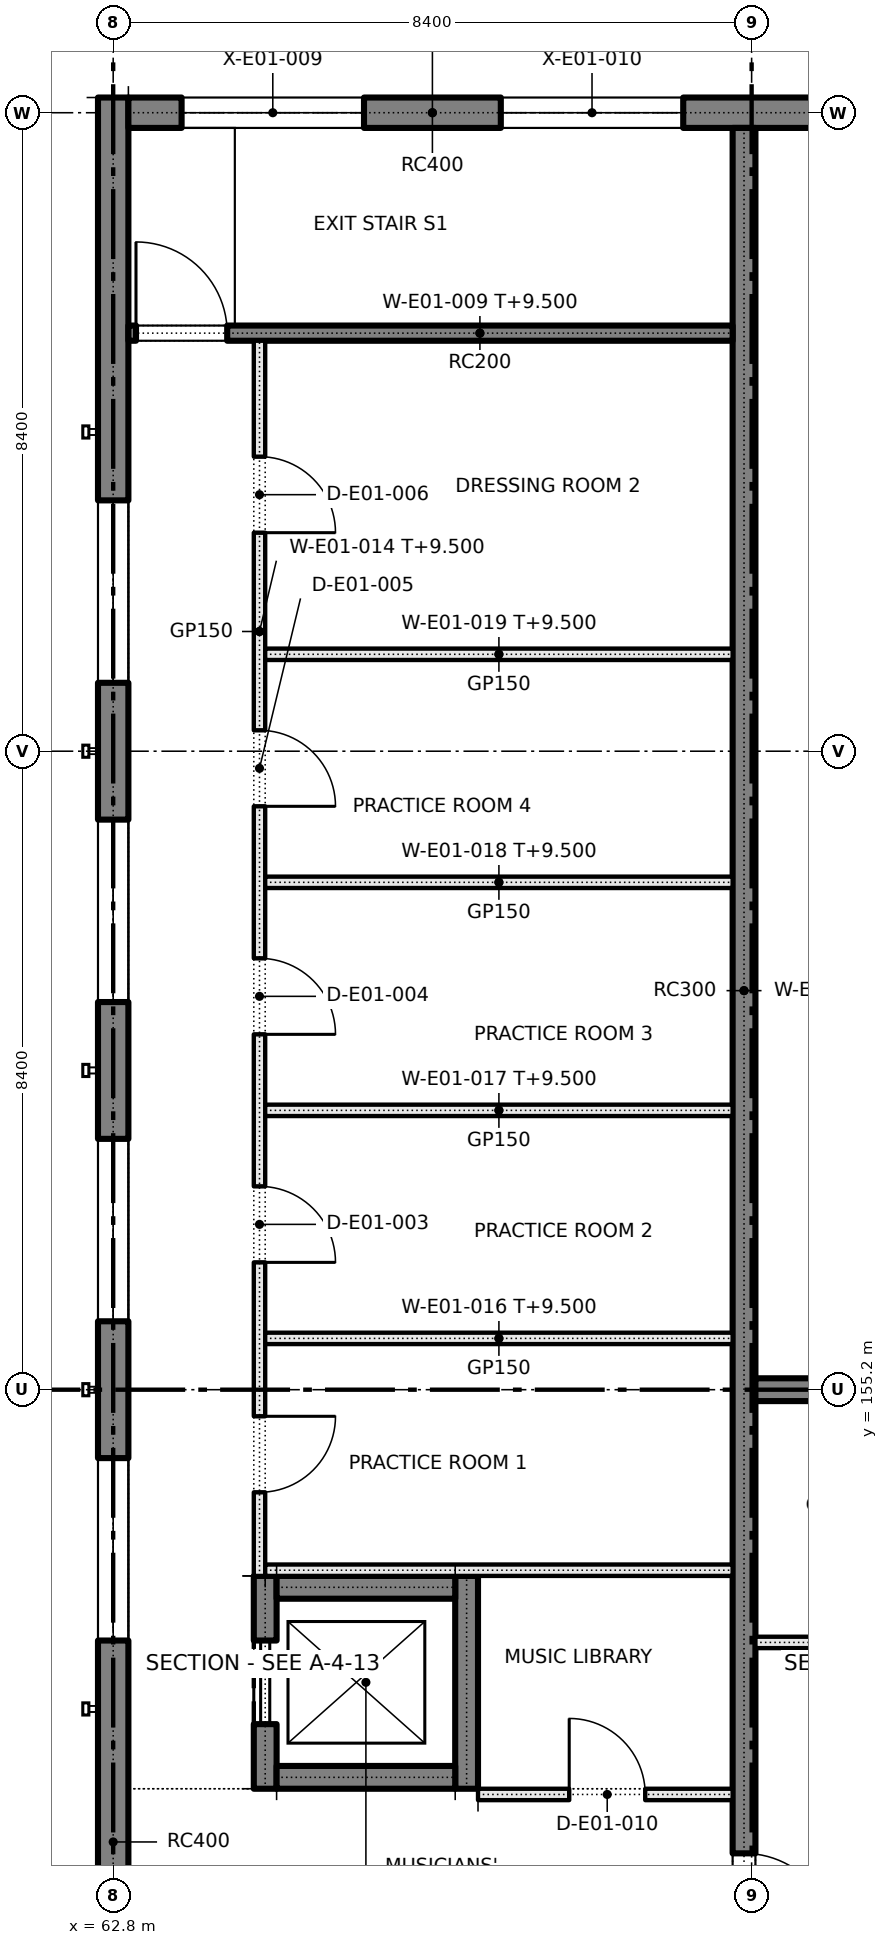
"""IFC4 building model, lengths in metres.
Left out: names, types, materials, properties, quantities, classifications, styles, units other than length and angle.
Written with IfcOpenShell. Run it as: python <this file> out.ifc"""

import sys

from ifc_helpers import new_model, si_unit, direction, frame, frame_2d, origin, place, context, subcontext, project, spatial, polyline, rectangle, outline, extrude, element, fill, save


model = new_model("IFC4")
c1 = context("Model", 3, precision=1e-05, world=origin(), true_north=direction((0.0, 1.0)))
c2 = subcontext(c1, "Body", "Model", "MODEL_VIEW")
j1 = project(units=[si_unit("LENGTHUNIT", "METRE"), si_unit("PLANEANGLEUNIT", "RADIAN")], contexts=[c1])
p1 = place(None, origin())
s1 = spatial("IfcSite", under=j1, at=p1, CompositionType="ELEMENT")
p2 = place(p1, origin())
s2 = spatial("IfcBuilding", under=s1, at=p2, CompositionType="ELEMENT")
p3 = place(p2, frame((0.0, 0.0, 5.4)))
s3 = spatial("IfcBuildingStorey", under=s2, at=p3, CompositionType="ELEMENT", Elevation=5.4)
p4 = place(p3, frame((62.8, 146.6, 0.0), z_axis=(0.0, 0.0, 1.0), x_axis=(0.0, 1.0, 0.0)))
e1 = element("IfcWall", 1, at=p4, inside=s3, PredefinedType="SOLIDWALL", context=c2, shape_type="SweptSolid", body=[
    extrude(rectangle(XDim=25.6, YDim=0.4, at=frame_2d((12.8, 0.0))), origin(), (0.0, 0.0, 1.0), 4.1),
])
p5 = place(p4, frame((5.3, 0.0, 0.9)))
e2 = element("IfcOpeningElement", 2, at=p5, cuts=e1, PredefinedType="OPENING", context=c2, shape_type="SweptSolid", body=[
    extrude(rectangle(XDim=2.4, YDim=2.4, at=frame_2d((1.2, 1.2))), frame((0.0, 0.21, 0.0), z_axis=(0.0, -1.0, 0.0), x_axis=(1.0, 0.0, 0.0)), (0.0, 0.0, 1.0), 0.42),
])
p6 = place(p4, frame((9.5, 0.0, 0.9)))
e3 = element("IfcOpeningElement", 3, at=p6, cuts=e1, PredefinedType="OPENING", context=c2, shape_type="SweptSolid", body=[
    extrude(rectangle(XDim=2.4, YDim=2.4, at=frame_2d((1.2, 1.2))), frame((0.0, 0.21, 0.0), z_axis=(0.0, -1.0, 0.0), x_axis=(1.0, 0.0, 0.0)), (0.0, 0.0, 1.0), 0.42),
])
p7 = place(p4, frame((13.7, 0.0, 0.9)))
e4 = element("IfcOpeningElement", 4, at=p7, cuts=e1, PredefinedType="OPENING", context=c2, shape_type="SweptSolid", body=[
    extrude(rectangle(XDim=2.4, YDim=2.4, at=frame_2d((1.2, 1.2))), frame((0.0, 0.21, 0.0), z_axis=(0.0, -1.0, 0.0), x_axis=(1.0, 0.0, 0.0)), (0.0, 0.0, 1.0), 0.42),
])
p8 = place(p4, frame((17.9, 0.0, 0.9)))
e5 = element("IfcOpeningElement", 5, at=p8, cuts=e1, PredefinedType="OPENING", context=c2, shape_type="SweptSolid", body=[
    extrude(rectangle(XDim=2.4, YDim=2.4, at=frame_2d((1.2, 1.2))), frame((0.0, 0.21, 0.0), z_axis=(0.0, -1.0, 0.0), x_axis=(1.0, 0.0, 0.0)), (0.0, 0.0, 1.0), 0.42),
])
p9 = place(p3, frame((63.0, 172.0, 0.0), z_axis=(0.0, 0.0, 1.0), x_axis=(1.0, 0.0, 0.0)))
e6 = element("IfcWall", 6, at=p9, inside=s3, PredefinedType="SOLIDWALL", context=c2, shape_type="SweptSolid", body=[
    extrude(outline(polyline([(0.0, 0.0), (24.8, 0.0), (24.8, 4.166), (22.802, 4.935), (20.721, 5.574), (18.641, 6.063), (16.561, 6.407), (14.48, 6.612), (12.4, 6.68), (10.32, 6.612), (8.239, 6.407), (6.159, 6.063), (4.079, 5.574), (1.998, 4.935), (0.0, 4.166), (0.0, 0.0)])), frame((0.0, 0.2, 0.0), z_axis=(0.0, -1.0, 0.0), x_axis=(1.0, 0.0, 0.0)), (0.0, 0.0, 1.0), 0.4),
])
p10 = place(p9, frame((0.7, 0.0, 1.5)))
e7 = element("IfcOpeningElement", 7, at=p10, cuts=e6, PredefinedType="OPENING", context=c2, shape_type="SweptSolid", body=[
    extrude(rectangle(XDim=2.4, YDim=2.1, at=frame_2d((1.2, 1.05))), frame((0.0, 0.21, 0.0), z_axis=(0.0, -1.0, 0.0), x_axis=(1.0, 0.0, 0.0)), (0.0, 0.0, 1.0), 0.42),
])
p11 = place(p9, frame((4.9, 0.0, 1.5)))
e8 = element("IfcOpeningElement", 8, at=p11, cuts=e6, PredefinedType="OPENING", context=c2, shape_type="SweptSolid", body=[
    extrude(rectangle(XDim=2.4, YDim=2.1, at=frame_2d((1.2, 1.05))), frame((0.0, 0.21, 0.0), z_axis=(0.0, -1.0, 0.0), x_axis=(1.0, 0.0, 0.0)), (0.0, 0.0, 1.0), 0.42),
])
p12 = place(p9, frame((9.1, 0.0, 1.5)))
e9 = element("IfcOpeningElement", 9, at=p12, cuts=e6, PredefinedType="OPENING", context=c2, shape_type="SweptSolid", body=[
    extrude(rectangle(XDim=2.4, YDim=2.1, at=frame_2d((1.2, 1.05))), frame((0.0, 0.21, 0.0), z_axis=(0.0, -1.0, 0.0), x_axis=(1.0, 0.0, 0.0)), (0.0, 0.0, 1.0), 0.42),
])
p13 = place(p9, frame((13.3, 0.0, 1.5)))
e10 = element("IfcOpeningElement", 10, at=p13, cuts=e6, PredefinedType="OPENING", context=c2, shape_type="SweptSolid", body=[
    extrude(rectangle(XDim=2.4, YDim=2.1, at=frame_2d((1.2, 1.05))), frame((0.0, 0.21, 0.0), z_axis=(0.0, -1.0, 0.0), x_axis=(1.0, 0.0, 0.0)), (0.0, 0.0, 1.0), 0.42),
])
p14 = place(p9, frame((17.5, 0.0, 1.5)))
e11 = element("IfcOpeningElement", 11, at=p14, cuts=e6, PredefinedType="OPENING", context=c2, shape_type="SweptSolid", body=[
    extrude(rectangle(XDim=2.4, YDim=2.1, at=frame_2d((1.2, 1.05))), frame((0.0, 0.21, 0.0), z_axis=(0.0, -1.0, 0.0), x_axis=(1.0, 0.0, 0.0)), (0.0, 0.0, 1.0), 0.42),
])
p15 = place(p9, frame((21.7, 0.0, 1.5)))
e12 = element("IfcOpeningElement", 12, at=p15, cuts=e6, PredefinedType="OPENING", context=c2, shape_type="SweptSolid", body=[
    extrude(rectangle(XDim=2.4, YDim=2.1, at=frame_2d((1.2, 1.05))), frame((0.0, 0.21, 0.0), z_axis=(0.0, -1.0, 0.0), x_axis=(1.0, 0.0, 0.0)), (0.0, 0.0, 1.0), 0.42),
])
p16 = place(p3, frame((71.1, 147.0, 0.0), z_axis=(0.0, 0.0, 1.0), x_axis=(0.0, 1.0, 0.0)))
e13 = element("IfcWall", 13, at=p16, inside=s3, PredefinedType="SOLIDWALL", context=c2, shape_type="SweptSolid", body=[
    extrude(rectangle(XDim=24.8, YDim=0.3, at=frame_2d((12.4, 0.0))), origin(), (0.0, 0.0, 1.0), 4.1),
])
p17 = place(p16, frame((0.9, 0.0, 0.0)))
e14 = element("IfcOpeningElement", 14, at=p17, cuts=e13, PredefinedType="OPENING", context=c2, shape_type="SweptSolid", body=[
    extrude(rectangle(XDim=1.2, YDim=2.1, at=frame_2d((0.6, 1.05))), frame((0.0, 0.16, 0.0), z_axis=(0.0, -1.0, 0.0), x_axis=(1.0, 0.0, 0.0)), (0.0, 0.0, 1.0), 0.32),
])
p18 = place(p3, frame((71.25, 155.2, 0.0), z_axis=(0.0, 0.0, 1.0), x_axis=(1.0, 0.0, 0.0)))
e15 = element("IfcWall", 15, at=p18, inside=s3, PredefinedType="SOLIDWALL", context=c2, shape_type="SweptSolid", body=[
    extrude(rectangle(XDim=16.55, YDim=0.3, at=frame_2d((8.275, 0.0))), origin(), (0.0, 0.0, 1.0), 4.1),
])
p19 = place(p18, frame((2.65, 0.0, 1.2)))
e16 = element("IfcOpeningElement", 16, at=p19, cuts=e15, PredefinedType="OPENING", context=c2, shape_type="SweptSolid", body=[
    extrude(rectangle(XDim=3.0, YDim=1.2, at=frame_2d((1.5, 0.6))), frame((0.0, 0.16, 0.0), z_axis=(0.0, -1.0, 0.0), x_axis=(1.0, 0.0, 0.0)), (0.0, 0.0, 1.0), 0.32),
])
p20 = place(p3, frame((63.0, 169.1, 0.0), z_axis=(0.0, 0.0, 1.0), x_axis=(1.0, 0.0, 0.0)))
e17 = element("IfcWall", 17, at=p20, inside=s3, PredefinedType="SOLIDWALL", context=c2, shape_type="SweptSolid", body=[
    extrude(rectangle(XDim=7.95, YDim=0.2, at=frame_2d((3.975, 0.0))), origin(), (0.0, 0.0, 1.0), 4.1),
])
p21 = place(p20, frame((0.1, 0.0, 0.0)))
e18 = element("IfcOpeningElement", 18, at=p21, cuts=e17, PredefinedType="OPENING", context=c2, shape_type="SweptSolid", body=[
    extrude(rectangle(XDim=1.2, YDim=2.1, at=frame_2d((0.6, 1.05))), frame((0.0, 0.11, 0.0), z_axis=(0.0, -1.0, 0.0), x_axis=(1.0, 0.0, 0.0)), (0.0, 0.0, 1.0), 0.22),
])
p22 = place(p3, frame((64.8, 149.95, 0.0), z_axis=(0.0, 0.0, 1.0), x_axis=(0.0, 1.0, 0.0)))
e19 = element("IfcWall", 19, at=p22, inside=s3, PredefinedType="SOLIDWALL", context=c2, shape_type="SweptSolid", body=[
    extrude(rectangle(XDim=2.8, YDim=0.3, at=frame_2d((1.4, 0.0))), origin(), (0.0, 0.0, 1.0), 3.9),
])
p23 = place(p22, frame((0.85, 0.0, 0.0)))
e20 = element("IfcOpeningElement", 20, at=p23, cuts=e19, PredefinedType="OPENING", context=c2, shape_type="SweptSolid", body=[
    extrude(rectangle(XDim=1.1, YDim=2.1, at=frame_2d((0.55, 1.05))), frame((0.0, 0.16, 0.0), z_axis=(0.0, -1.0, 0.0), x_axis=(1.0, 0.0, 0.0)), (0.0, 0.0, 1.0), 0.32),
])
p24 = place(p3, frame((67.45, 149.95, 0.0), z_axis=(0.0, 0.0, 1.0), x_axis=(0.0, 1.0, 0.0)))
e21 = element("IfcWall", 21, at=p24, inside=s3, PredefinedType="SOLIDWALL", context=c2, shape_type="SweptSolid", body=[
    extrude(rectangle(XDim=2.8, YDim=0.3, at=frame_2d((1.4, 0.0))), origin(), (0.0, 0.0, 1.0), 3.9),
])
for number, where, z_axis, x_axis in (
    (22, (64.95, 150.1, 0.0), (0.0, 0.0, 1.0), (1.0, 0.0, 0.0)),
    (23, (64.95, 152.6, 0.0), (0.0, 0.0, 1.0), (1.0, 0.0, 0.0)),
):
    element("IfcWall", number, at=place(p3, frame(where, z_axis=z_axis, x_axis=x_axis)), inside=s3, PredefinedType="SOLIDWALL", context=c2, shape_type="SweptSolid", body=[
        extrude(rectangle(XDim=2.35, YDim=0.3, at=frame_2d((1.175, 0.0))), origin(), (0.0, 0.0, 1.0), 3.9),
    ])
p25 = place(p3, frame((64.725, 152.75, 0.0), z_axis=(0.0, 0.0, 1.0), x_axis=(0.0, 1.0, 0.0)))
e24 = element("IfcWall", 24, at=p25, inside=s3, PredefinedType="PARTITIONING", context=c2, shape_type="SweptSolid", body=[
    extrude(rectangle(XDim=16.25, YDim=0.15, at=frame_2d((8.125, 0.0))), origin(), (0.0, 0.0, 1.0), 4.1),
])
p26 = place(p25, frame((1.1, 0.0, 0.0)))
e25 = element("IfcOpeningElement", 25, at=p26, cuts=e24, PredefinedType="OPENING", context=c2, shape_type="SweptSolid", body=[
    extrude(rectangle(XDim=1.0, YDim=2.1, at=frame_2d((0.5, 1.05))), frame((0.0, 0.085, 0.0), z_axis=(0.0, -1.0, 0.0), x_axis=(1.0, 0.0, 0.0)), (0.0, 0.0, 1.0), 0.17),
])
p27 = place(p25, frame((4.125, 0.0, 0.0)))
e26 = element("IfcOpeningElement", 26, at=p27, cuts=e24, PredefinedType="OPENING", context=c2, shape_type="SweptSolid", body=[
    extrude(rectangle(XDim=1.0, YDim=2.1, at=frame_2d((0.5, 1.05))), frame((0.0, 0.085, 0.0), z_axis=(0.0, -1.0, 0.0), x_axis=(1.0, 0.0, 0.0)), (0.0, 0.0, 1.0), 0.17),
])
p28 = place(p25, frame((7.125, 0.0, 0.0)))
e27 = element("IfcOpeningElement", 27, at=p28, cuts=e24, PredefinedType="OPENING", context=c2, shape_type="SweptSolid", body=[
    extrude(rectangle(XDim=1.0, YDim=2.1, at=frame_2d((0.5, 1.05))), frame((0.0, 0.085, 0.0), z_axis=(0.0, -1.0, 0.0), x_axis=(1.0, 0.0, 0.0)), (0.0, 0.0, 1.0), 0.17),
])
p29 = place(p25, frame((10.125, 0.0, 0.0)))
e28 = element("IfcOpeningElement", 28, at=p29, cuts=e24, PredefinedType="OPENING", context=c2, shape_type="SweptSolid", body=[
    extrude(rectangle(XDim=1.0, YDim=2.1, at=frame_2d((0.5, 1.05))), frame((0.0, 0.085, 0.0), z_axis=(0.0, -1.0, 0.0), x_axis=(1.0, 0.0, 0.0)), (0.0, 0.0, 1.0), 0.17),
])
p30 = place(p25, frame((13.725, 0.0, 0.0)))
e29 = element("IfcOpeningElement", 29, at=p30, cuts=e24, PredefinedType="OPENING", context=c2, shape_type="SweptSolid", body=[
    extrude(rectangle(XDim=1.0, YDim=2.1, at=frame_2d((0.5, 1.05))), frame((0.0, 0.085, 0.0), z_axis=(0.0, -1.0, 0.0), x_axis=(1.0, 0.0, 0.0)), (0.0, 0.0, 1.0), 0.17),
])
for number, where, z_axis, x_axis in (
    (30, (64.8, 152.825, 0.0), (0.0, 0.0, 1.0), (1.0, 0.0, 0.0)),
    (31, (64.8, 155.875, 0.0), (0.0, 0.0, 1.0), (1.0, 0.0, 0.0)),
    (32, (64.8, 158.875, 0.0), (0.0, 0.0, 1.0), (1.0, 0.0, 0.0)),
    (33, (64.8, 161.875, 0.0), (0.0, 0.0, 1.0), (1.0, 0.0, 0.0)),
    (34, (64.8, 164.875, 0.0), (0.0, 0.0, 1.0), (1.0, 0.0, 0.0)),
):
    element("IfcWall", number, at=place(p3, frame(where, z_axis=z_axis, x_axis=x_axis)), inside=s3, PredefinedType="PARTITIONING", context=c2, shape_type="SweptSolid", body=[
        extrude(rectangle(XDim=6.15, YDim=0.15, at=frame_2d((3.075, 0.0))), origin(), (0.0, 0.0, 1.0), 4.1),
    ])
p31 = place(p3, frame((67.6, 149.875, 0.0), z_axis=(0.0, 0.0, 1.0), x_axis=(1.0, 0.0, 0.0)))
e35 = element("IfcWall", 35, at=p31, inside=s3, PredefinedType="PARTITIONING", context=c2, shape_type="SweptSolid", body=[
    extrude(rectangle(XDim=3.35, YDim=0.15, at=frame_2d((1.675, 0.0))), origin(), (0.0, 0.0, 1.0), 4.1),
])
p32 = place(p31, frame((1.2, 0.0, 0.0)))
e36 = element("IfcOpeningElement", 36, at=p32, cuts=e35, PredefinedType="OPENING", context=c2, shape_type="SweptSolid", body=[
    extrude(rectangle(XDim=1.0, YDim=2.1, at=frame_2d((0.5, 1.05))), frame((0.0, 0.085, 0.0), z_axis=(0.0, -1.0, 0.0), x_axis=(1.0, 0.0, 0.0)), (0.0, 0.0, 1.0), 0.17),
])
p33 = place(p3, frame((71.25, 151.875, 0.0), z_axis=(0.0, 0.0, 1.0), x_axis=(1.0, 0.0, 0.0)))
e37 = element("IfcWall", 37, at=p33, inside=s3, PredefinedType="PARTITIONING", context=c2, shape_type="SweptSolid", body=[
    extrude(rectangle(XDim=8.35, YDim=0.15, at=frame_2d((4.175, 0.0))), origin(), (0.0, 0.0, 1.0), 4.1),
])
p34 = place(p33, frame((3.65, 0.0, 0.0)))
e38 = element("IfcOpeningElement", 38, at=p34, cuts=e37, PredefinedType="OPENING", context=c2, shape_type="SweptSolid", body=[
    extrude(rectangle(XDim=1.0, YDim=2.1, at=frame_2d((0.5, 1.05))), frame((0.0, 0.085, 0.0), z_axis=(0.0, -1.0, 0.0), x_axis=(1.0, 0.0, 0.0)), (0.0, 0.0, 1.0), 0.17),
])
p35 = place(p23, origin())
e39 = element("IfcDoor", 39, at=p35, inside=s3, OperationType="SLIDING_TO_LEFT", PredefinedType="DOOR", context=c2, shape_type="SweptSolid", body=[
    extrude(rectangle(XDim=1.1, YDim=2.1, at=frame_2d((0.55, 1.05))), frame((0.0, 0.025, 0.0), z_axis=(0.0, -1.0, 0.0), x_axis=(1.0, 0.0, 0.0)), (0.0, 0.0, 1.0), 0.05),
])
fill(e20, e39)
p36 = place(p5, origin())
e40 = element("IfcWindow", 40, at=p36, inside=s3, PartitioningType="SINGLE_PANEL", PredefinedType="WINDOW", context=c2, shape_type="SweptSolid", body=[
    extrude(rectangle(XDim=2.4, YDim=2.4, at=frame_2d((1.2, 1.2))), frame((0.0, 0.03, 0.0), z_axis=(0.0, -1.0, 0.0), x_axis=(1.0, 0.0, 0.0)), (0.0, 0.0, 1.0), 0.06),
])
fill(e2, e40)
p37 = place(p6, origin())
e41 = element("IfcWindow", 41, at=p37, inside=s3, PartitioningType="SINGLE_PANEL", PredefinedType="WINDOW", context=c2, shape_type="SweptSolid", body=[
    extrude(rectangle(XDim=2.4, YDim=2.4, at=frame_2d((1.2, 1.2))), frame((0.0, 0.03, 0.0), z_axis=(0.0, -1.0, 0.0), x_axis=(1.0, 0.0, 0.0)), (0.0, 0.0, 1.0), 0.06),
])
fill(e3, e41)
p38 = place(p7, origin())
e42 = element("IfcWindow", 42, at=p38, inside=s3, PartitioningType="SINGLE_PANEL", PredefinedType="WINDOW", context=c2, shape_type="SweptSolid", body=[
    extrude(rectangle(XDim=2.4, YDim=2.4, at=frame_2d((1.2, 1.2))), frame((0.0, 0.03, 0.0), z_axis=(0.0, -1.0, 0.0), x_axis=(1.0, 0.0, 0.0)), (0.0, 0.0, 1.0), 0.06),
])
fill(e4, e42)
p39 = place(p8, origin())
e43 = element("IfcWindow", 43, at=p39, inside=s3, PartitioningType="SINGLE_PANEL", PredefinedType="WINDOW", context=c2, shape_type="SweptSolid", body=[
    extrude(rectangle(XDim=2.4, YDim=2.4, at=frame_2d((1.2, 1.2))), frame((0.0, 0.03, 0.0), z_axis=(0.0, -1.0, 0.0), x_axis=(1.0, 0.0, 0.0)), (0.0, 0.0, 1.0), 0.06),
])
fill(e5, e43)
p40 = place(p10, origin())
e44 = element("IfcWindow", 44, at=p40, inside=s3, PartitioningType="SINGLE_PANEL", PredefinedType="WINDOW", context=c2, shape_type="SweptSolid", body=[
    extrude(rectangle(XDim=2.4, YDim=2.1, at=frame_2d((1.2, 1.05))), frame((0.0, 0.03, 0.0), z_axis=(0.0, -1.0, 0.0), x_axis=(1.0, 0.0, 0.0)), (0.0, 0.0, 1.0), 0.06),
])
fill(e7, e44)
p41 = place(p11, origin())
e45 = element("IfcWindow", 45, at=p41, inside=s3, PartitioningType="SINGLE_PANEL", PredefinedType="WINDOW", context=c2, shape_type="SweptSolid", body=[
    extrude(rectangle(XDim=2.4, YDim=2.1, at=frame_2d((1.2, 1.05))), frame((0.0, 0.03, 0.0), z_axis=(0.0, -1.0, 0.0), x_axis=(1.0, 0.0, 0.0)), (0.0, 0.0, 1.0), 0.06),
])
fill(e8, e45)
p42 = place(p26, frame((1.0, 0.0, 0.0), z_axis=(0.0, 0.0, 1.0), x_axis=(-1.0, 0.0, 0.0)))
e46 = element("IfcDoor", 46, at=p42, inside=s3, OperationType="SINGLE_SWING_LEFT", PredefinedType="DOOR", context=c2, shape_type="SweptSolid", body=[
    extrude(rectangle(XDim=1.0, YDim=2.1, at=frame_2d((0.5, 1.05))), frame((0.0, 0.025, 0.0), z_axis=(0.0, -1.0, 0.0), x_axis=(1.0, 0.0, 0.0)), (0.0, 0.0, 1.0), 0.05),
])
fill(e25, e46)
p43 = place(p27, frame((1.0, 0.0, 0.0), z_axis=(0.0, 0.0, 1.0), x_axis=(-1.0, 0.0, 0.0)))
e47 = element("IfcDoor", 47, at=p43, inside=s3, OperationType="SINGLE_SWING_RIGHT", PredefinedType="DOOR", context=c2, shape_type="SweptSolid", body=[
    extrude(rectangle(XDim=1.0, YDim=2.1, at=frame_2d((0.5, 1.05))), frame((0.0, 0.025, 0.0), z_axis=(0.0, -1.0, 0.0), x_axis=(1.0, 0.0, 0.0)), (0.0, 0.0, 1.0), 0.05),
])
fill(e26, e47)
p44 = place(p28, frame((1.0, 0.0, 0.0), z_axis=(0.0, 0.0, 1.0), x_axis=(-1.0, 0.0, 0.0)))
e48 = element("IfcDoor", 48, at=p44, inside=s3, OperationType="SINGLE_SWING_RIGHT", PredefinedType="DOOR", context=c2, shape_type="SweptSolid", body=[
    extrude(rectangle(XDim=1.0, YDim=2.1, at=frame_2d((0.5, 1.05))), frame((0.0, 0.025, 0.0), z_axis=(0.0, -1.0, 0.0), x_axis=(1.0, 0.0, 0.0)), (0.0, 0.0, 1.0), 0.05),
])
fill(e27, e48)
p45 = place(p29, frame((1.0, 0.0, 0.0), z_axis=(0.0, 0.0, 1.0), x_axis=(-1.0, 0.0, 0.0)))
e49 = element("IfcDoor", 49, at=p45, inside=s3, OperationType="SINGLE_SWING_RIGHT", PredefinedType="DOOR", context=c2, shape_type="SweptSolid", body=[
    extrude(rectangle(XDim=1.0, YDim=2.1, at=frame_2d((0.5, 1.05))), frame((0.0, 0.025, 0.0), z_axis=(0.0, -1.0, 0.0), x_axis=(1.0, 0.0, 0.0)), (0.0, 0.0, 1.0), 0.05),
])
fill(e28, e49)
p46 = place(p30, frame((1.0, 0.0, 0.0), z_axis=(0.0, 0.0, 1.0), x_axis=(-1.0, 0.0, 0.0)))
e50 = element("IfcDoor", 50, at=p46, inside=s3, OperationType="SINGLE_SWING_RIGHT", PredefinedType="DOOR", context=c2, shape_type="SweptSolid", body=[
    extrude(rectangle(XDim=1.0, YDim=2.1, at=frame_2d((0.5, 1.05))), frame((0.0, 0.025, 0.0), z_axis=(0.0, -1.0, 0.0), x_axis=(1.0, 0.0, 0.0)), (0.0, 0.0, 1.0), 0.05),
])
fill(e29, e50)
p47 = place(p17, frame((1.2, 0.0, 0.0), z_axis=(0.0, 0.0, 1.0), x_axis=(-1.0, 0.0, 0.0)))
e51 = element("IfcDoor", 51, at=p47, inside=s3, OperationType="SINGLE_SWING_RIGHT", PredefinedType="DOOR", context=c2, shape_type="SweptSolid", body=[
    extrude(rectangle(XDim=1.2, YDim=2.1, at=frame_2d((0.6, 1.05))), frame((0.0, 0.025, 0.0), z_axis=(0.0, -1.0, 0.0), x_axis=(1.0, 0.0, 0.0)), (0.0, 0.0, 1.0), 0.05),
])
fill(e14, e51)
p48 = place(p21, origin())
e52 = element("IfcDoor", 52, at=p48, inside=s3, OperationType="SINGLE_SWING_LEFT", PredefinedType="DOOR", context=c2, shape_type="SweptSolid", body=[
    extrude(rectangle(XDim=1.2, YDim=2.1, at=frame_2d((0.6, 1.05))), frame((0.0, 0.025, 0.0), z_axis=(0.0, -1.0, 0.0), x_axis=(1.0, 0.0, 0.0)), (0.0, 0.0, 1.0), 0.05),
])
fill(e18, e52)
p49 = place(p32, origin())
e53 = element("IfcDoor", 53, at=p49, inside=s3, OperationType="SINGLE_SWING_LEFT", PredefinedType="DOOR", context=c2, shape_type="SweptSolid", body=[
    extrude(rectangle(XDim=1.0, YDim=2.1, at=frame_2d((0.5, 1.05))), frame((0.0, 0.025, 0.0), z_axis=(0.0, -1.0, 0.0), x_axis=(1.0, 0.0, 0.0)), (0.0, 0.0, 1.0), 0.05),
])
fill(e36, e53)
save(model, sys.argv[1])
